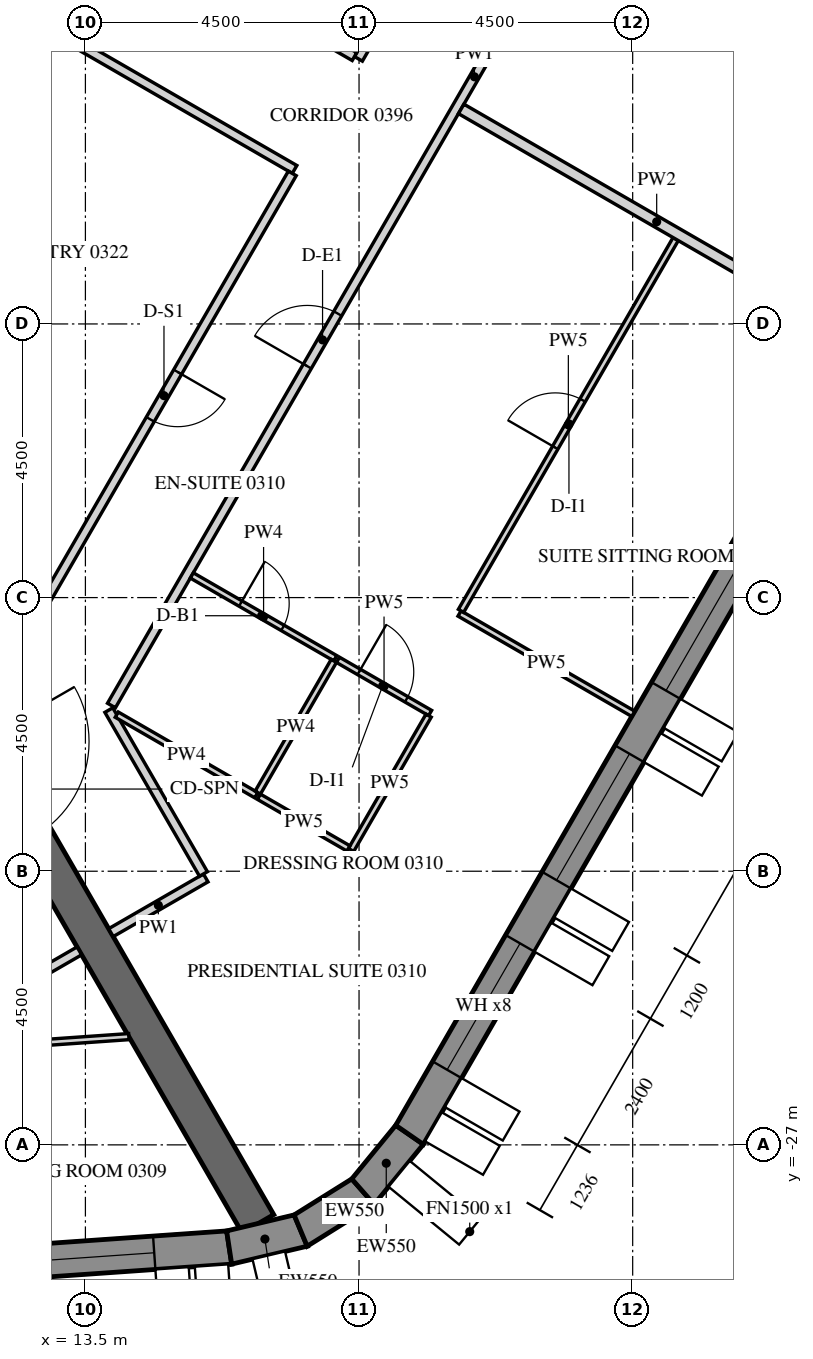
"""IFC4 building model, lengths in metres.
Left out: names, types, materials, properties, quantities, classifications, styles, units other than length and angle.
Written with IfcOpenShell. Run it as: python <this file> out.ifc"""

import sys

from ifc_helpers import new_model, si_unit, direction, frame, frame_2d, origin, place, context, subcontext, project, spatial, polyline, rectangle, outline, extrude, element, fill, save


model = new_model("IFC4")
c1 = context("Model", 3, precision=1e-05, world=origin(), true_north=direction((0.0, 1.0)))
c2 = subcontext(c1, "Body", "Model", "MODEL_VIEW")
j1 = project(units=[si_unit("LENGTHUNIT", "METRE"), si_unit("PLANEANGLEUNIT", "RADIAN")], contexts=[c1])
p1 = place(None, origin())
s1 = spatial("IfcSite", under=j1, at=p1, CompositionType="ELEMENT")
p2 = place(p1, origin())
s2 = spatial("IfcBuilding", under=s1, at=p2, CompositionType="ELEMENT")
p3 = place(p2, frame((0.0, 0.0, 60.9)))
s3 = spatial("IfcBuildingStorey", under=s2, at=p3, CompositionType="ELEMENT", Elevation=60.9)
p4 = place(p3, frame((-14.134, -30.786, -0.15), z_axis=(0.0, 0.0, 1.0), x_axis=(0.997564037441, 0.069756657061, 0.0)))
e1 = element("IfcWall", 1, at=p4, inside=s3, PredefinedType="SOLIDWALL", context=c2, shape_type="SweptSolid", body=[
    extrude(outline(polyline([(-0.026, -0.275), (30.094, -0.275), (30.049, 0.275), (0.026, 0.275), (-0.026, -0.275)])), origin(), (0.0, 0.0, 1.0), 3.9),
])
p5 = place(p4, frame((1.236, 0.0, 1.05)))
e2 = element("IfcOpeningElement", 2, at=p5, cuts=e1, PredefinedType="OPENING", context=c2, shape_type="SweptSolid", body=[
    extrude(rectangle(XDim=2.4, YDim=2.4, at=frame_2d((1.2, 1.2))), frame((0.0, 0.285, 0.0), z_axis=(0.0, -1.0, 0.0), x_axis=(1.0, 0.0, 0.0)), (0.0, 0.0, 1.0), 0.57),
])
p6 = place(p4, frame((4.835, 0.0, 1.05)))
e3 = element("IfcOpeningElement", 3, at=p6, cuts=e1, PredefinedType="OPENING", context=c2, shape_type="SweptSolid", body=[
    extrude(rectangle(XDim=2.4, YDim=2.4, at=frame_2d((1.2, 1.2))), frame((0.0, 0.285, 0.0), z_axis=(0.0, -1.0, 0.0), x_axis=(1.0, 0.0, 0.0)), (0.0, 0.0, 1.0), 0.57),
])
p7 = place(p4, frame((8.436, 0.0, 1.05)))
e4 = element("IfcOpeningElement", 4, at=p7, cuts=e1, PredefinedType="OPENING", context=c2, shape_type="SweptSolid", body=[
    extrude(rectangle(XDim=2.4, YDim=2.4, at=frame_2d((1.2, 1.2))), frame((0.0, 0.285, 0.0), z_axis=(0.0, -1.0, 0.0), x_axis=(1.0, 0.0, 0.0)), (0.0, 0.0, 1.0), 0.57),
])
p8 = place(p4, frame((12.035, 0.0, 1.05)))
e5 = element("IfcOpeningElement", 5, at=p8, cuts=e1, PredefinedType="OPENING", context=c2, shape_type="SweptSolid", body=[
    extrude(rectangle(XDim=2.4, YDim=2.4, at=frame_2d((1.2, 1.2))), frame((0.0, 0.285, 0.0), z_axis=(0.0, -1.0, 0.0), x_axis=(1.0, 0.0, 0.0)), (0.0, 0.0, 1.0), 0.57),
])
p9 = place(p4, frame((15.635, 0.0, 1.05)))
e6 = element("IfcOpeningElement", 6, at=p9, cuts=e1, PredefinedType="OPENING", context=c2, shape_type="SweptSolid", body=[
    extrude(rectangle(XDim=2.4, YDim=2.4, at=frame_2d((1.2, 1.2))), frame((0.0, 0.285, 0.0), z_axis=(0.0, -1.0, 0.0), x_axis=(1.0, 0.0, 0.0)), (0.0, 0.0, 1.0), 0.57),
])
p10 = place(p4, frame((19.236, 0.0, 1.05)))
e7 = element("IfcOpeningElement", 7, at=p10, cuts=e1, PredefinedType="OPENING", context=c2, shape_type="SweptSolid", body=[
    extrude(rectangle(XDim=2.4, YDim=2.4, at=frame_2d((1.2, 1.2))), frame((0.0, 0.285, 0.0), z_axis=(0.0, -1.0, 0.0), x_axis=(1.0, 0.0, 0.0)), (0.0, 0.0, 1.0), 0.57),
])
p11 = place(p4, frame((22.835, 0.0, 1.05)))
e8 = element("IfcOpeningElement", 8, at=p11, cuts=e1, PredefinedType="OPENING", context=c2, shape_type="SweptSolid", body=[
    extrude(rectangle(XDim=2.4, YDim=2.4, at=frame_2d((1.2, 1.2))), frame((0.0, 0.285, 0.0), z_axis=(0.0, -1.0, 0.0), x_axis=(1.0, 0.0, 0.0)), (0.0, 0.0, 1.0), 0.57),
])
p12 = place(p4, frame((26.436, 0.0, 1.05)))
e9 = element("IfcOpeningElement", 9, at=p12, cuts=e1, PredefinedType="OPENING", context=c2, shape_type="SweptSolid", body=[
    extrude(rectangle(XDim=2.4, YDim=2.4, at=frame_2d((1.2, 1.2))), frame((0.0, 0.285, 0.0), z_axis=(0.0, -1.0, 0.0), x_axis=(1.0, 0.0, 0.0)), (0.0, 0.0, 1.0), 0.57),
])
p13 = place(p3, frame((15.864, -28.688, -0.15), z_axis=(0.0, 0.0, 1.0), x_axis=(0.973063591128, 0.230536868247, 0.0)))
e10 = element("IfcWall", 10, at=p13, inside=s3, PredefinedType="SOLIDWALL", context=c2, shape_type="SweptSolid", body=[
    extrude(outline(polyline([(-0.022, -0.275), (1.253, -0.275), (1.163, 0.275), (0.022, 0.275), (-0.022, -0.275)])), origin(), (0.0, 0.0, 1.0), 3.9),
])
p14 = place(p3, frame((17.04, -28.41, -0.15), z_axis=(0.0, 0.0, 1.0), x_axis=(0.847952888306, 0.530071598195, 0.0)))
e11 = element("IfcWall", 11, at=p14, inside=s3, PredefinedType="SOLIDWALL", context=c2, shape_type="SweptSolid", body=[
    extrude(outline(polyline([(-0.045, -0.275), (1.253, -0.275), (1.163, 0.275), (0.045, 0.275), (-0.045, -0.275)])), origin(), (0.0, 0.0, 1.0), 3.9),
])
p15 = place(p3, frame((18.064, -27.769, -0.15), z_axis=(0.0, 0.0, 1.0), x_axis=(0.633842757806, 0.773461930787, 0.0)))
e12 = element("IfcWall", 12, at=p15, inside=s3, PredefinedType="SOLIDWALL", context=c2, shape_type="SweptSolid", body=[
    extrude(outline(polyline([(-0.045, -0.275), (1.231, -0.275), (1.186, 0.275), (0.045, 0.275), (-0.045, -0.275)])), origin(), (0.0, 0.0, 1.0), 3.9),
])
p16 = place(p3, frame((18.83, -26.835, -0.15), z_axis=(0.0, 0.0, 1.0), x_axis=(0.500003800416, 0.866023209602, 0.0)))
e13 = element("IfcWall", 13, at=p16, inside=s3, PredefinedType="SOLIDWALL", context=c2, shape_type="SweptSolid", body=[
    extrude(outline(polyline([(-0.022, -0.275), (30.097, -0.275), (30.045, 0.275), (0.022, 0.275), (-0.022, -0.275)])), origin(), (0.0, 0.0, 1.0), 3.9),
])
p17 = place(p16, frame((1.236, 0.0, 1.05)))
e14 = element("IfcOpeningElement", 14, at=p17, cuts=e13, PredefinedType="OPENING", context=c2, shape_type="SweptSolid", body=[
    extrude(rectangle(XDim=2.4, YDim=2.4, at=frame_2d((1.2, 1.2))), frame((0.0, 0.285, 0.0), z_axis=(0.0, -1.0, 0.0), x_axis=(1.0, 0.0, 0.0)), (0.0, 0.0, 1.0), 0.57),
])
p18 = place(p16, frame((4.835, 0.0, 1.05)))
e15 = element("IfcOpeningElement", 15, at=p18, cuts=e13, PredefinedType="OPENING", context=c2, shape_type="SweptSolid", body=[
    extrude(rectangle(XDim=2.4, YDim=2.4, at=frame_2d((1.2, 1.2))), frame((0.0, 0.285, 0.0), z_axis=(0.0, -1.0, 0.0), x_axis=(1.0, 0.0, 0.0)), (0.0, 0.0, 1.0), 0.57),
])
p19 = place(p16, frame((8.436, 0.0, 1.05)))
e16 = element("IfcOpeningElement", 16, at=p19, cuts=e13, PredefinedType="OPENING", context=c2, shape_type="SweptSolid", body=[
    extrude(rectangle(XDim=2.4, YDim=2.4, at=frame_2d((1.2, 1.2))), frame((0.0, 0.285, 0.0), z_axis=(0.0, -1.0, 0.0), x_axis=(1.0, 0.0, 0.0)), (0.0, 0.0, 1.0), 0.57),
])
p20 = place(p16, frame((12.035, 0.0, 1.05)))
e17 = element("IfcOpeningElement", 17, at=p20, cuts=e13, PredefinedType="OPENING", context=c2, shape_type="SweptSolid", body=[
    extrude(rectangle(XDim=2.4, YDim=2.4, at=frame_2d((1.2, 1.2))), frame((0.0, 0.285, 0.0), z_axis=(0.0, -1.0, 0.0), x_axis=(1.0, 0.0, 0.0)), (0.0, 0.0, 1.0), 0.57),
])
p21 = place(p16, frame((15.635, 0.0, 1.05)))
e18 = element("IfcOpeningElement", 18, at=p21, cuts=e13, PredefinedType="OPENING", context=c2, shape_type="SweptSolid", body=[
    extrude(rectangle(XDim=2.4, YDim=2.4, at=frame_2d((1.2, 1.2))), frame((0.0, 0.285, 0.0), z_axis=(0.0, -1.0, 0.0), x_axis=(1.0, 0.0, 0.0)), (0.0, 0.0, 1.0), 0.57),
])
p22 = place(p16, frame((19.236, 0.0, 1.05)))
e19 = element("IfcOpeningElement", 19, at=p22, cuts=e13, PredefinedType="OPENING", context=c2, shape_type="SweptSolid", body=[
    extrude(rectangle(XDim=2.4, YDim=2.4, at=frame_2d((1.2, 1.2))), frame((0.0, 0.285, 0.0), z_axis=(0.0, -1.0, 0.0), x_axis=(1.0, 0.0, 0.0)), (0.0, 0.0, 1.0), 0.57),
])
p23 = place(p16, frame((22.835, 0.0, 1.05)))
e20 = element("IfcOpeningElement", 20, at=p23, cuts=e13, PredefinedType="OPENING", context=c2, shape_type="SweptSolid", body=[
    extrude(rectangle(XDim=2.4, YDim=2.4, at=frame_2d((1.2, 1.2))), frame((0.0, 0.285, 0.0), z_axis=(0.0, -1.0, 0.0), x_axis=(1.0, 0.0, 0.0)), (0.0, 0.0, 1.0), 0.57),
])
p24 = place(p16, frame((26.436, 0.0, 1.05)))
e21 = element("IfcOpeningElement", 21, at=p24, cuts=e13, PredefinedType="OPENING", context=c2, shape_type="SweptSolid", body=[
    extrude(rectangle(XDim=2.4, YDim=2.4, at=frame_2d((1.2, 1.2))), frame((0.0, 0.285, 0.0), z_axis=(0.0, -1.0, 0.0), x_axis=(1.0, 0.0, 0.0)), (0.0, 0.0, 1.0), 0.57),
])
p25 = place(p3, frame((7.91, -13.7, -0.15), z_axis=(0.0, 0.0, 1.0), x_axis=(0.499999880136, 0.866025472988, 0.0)))
e22 = element("IfcWall", 22, at=p25, inside=s3, PredefinedType="SHEAR", context=c2, shape_type="SweptSolid", body=[
    extrude(outline(polyline([(-0.173, -0.3), (15.993, -0.3), (15.646, 0.3), (0.173, 0.3), (-0.173, -0.3)])), origin(), (0.0, 0.0, 1.0), 3.9),
])
p26 = place(p25, frame((7.039, 0.0, 0.15)))
e23 = element("IfcOpeningElement", 23, at=p26, cuts=e22, PredefinedType="OPENING", context=c2, shape_type="SweptSolid", body=[
    extrude(rectangle(XDim=1.8, YDim=2.4, at=frame_2d((0.9, 1.2))), frame((0.0, 0.31, 0.0), z_axis=(0.0, -1.0, 0.0), x_axis=(1.0, 0.0, 0.0)), (0.0, 0.0, 1.0), 0.62),
])
p27 = place(p3, frame((8.083, -14.0, -0.15), z_axis=(0.0, 0.0, 1.0), x_axis=(0.499997680643, -0.866026742862, 0.0)))
e24 = element("IfcWall", 24, at=p27, inside=s3, PredefinedType="SHEAR", context=c2, shape_type="SweptSolid", body=[
    extrude(rectangle(XDim=16.509, YDim=0.6, at=frame_2d((8.254, 0.0))), origin(), (0.0, 0.0, 1.0), 3.9),
])
p28 = place(p27, frame((7.354, 0.0, 0.15)))
e25 = element("IfcOpeningElement", 25, at=p28, cuts=e24, PredefinedType="OPENING", context=c2, shape_type="SweptSolid", body=[
    extrude(rectangle(XDim=1.8, YDim=2.4, at=frame_2d((0.9, 1.2))), frame((0.0, 0.31, 0.0), z_axis=(0.0, -1.0, 0.0), x_axis=(1.0, 0.0, 0.0)), (0.0, 0.0, 1.0), 0.62),
])
p29 = place(p3, frame((11.906, -24.673, 0.0), z_axis=(0.0, 0.0, 1.0), x_axis=(0.866013532718, 0.500020560727, 0.0)))
e26 = element("IfcWall", 26, at=p29, inside=s3, PredefinedType="PARTITIONING", context=c2, shape_type="SweptSolid", body=[
    extrude(rectangle(XDim=1.725, YDim=0.15, at=frame_2d((0.863, 0.0))), origin(), (0.0, 0.0, 1.0), 2.988),
])
p30 = place(p3, frame((13.92, -23.51, 0.0), z_axis=(0.0, 0.0, 1.0), x_axis=(0.866047807691, 0.499961193289, 0.0)))
e27 = element("IfcWall", 27, at=p30, inside=s3, PredefinedType="PARTITIONING", context=c2, shape_type="SweptSolid", body=[
    extrude(rectangle(XDim=1.8, YDim=0.15, at=frame_2d((0.9, 0.0))), origin(), (0.0, 0.0, 1.0), 2.988),
])
p31 = place(p3, frame((15.441, -22.545, 0.0), z_axis=(0.0, 0.0, 1.0), x_axis=(-0.500037089193, 0.86600398927, 0.0)))
e28 = element("IfcWall", 28, at=p31, inside=s3, PredefinedType="PARTITIONING", context=c2, shape_type="SweptSolid", body=[
    extrude(rectangle(XDim=3.112, YDim=0.15, at=frame_2d((1.556, 0.0))), origin(), (0.0, 0.0, 1.0), 2.988),
])
p32 = place(p3, frame((13.928, -19.775, 0.0), z_axis=(0.0, 0.0, 1.0), x_axis=(0.50000450071, 0.866022805283, 0.0)))
e29 = element("IfcWall", 29, at=p32, inside=s3, PredefinedType="PARTITIONING", context=c2, shape_type="SweptSolid", body=[
    extrude(rectangle(XDim=23.877, YDim=0.15, at=frame_2d((11.938, 0.0))), origin(), (0.0, 0.0, 1.0), 2.988),
])
p33 = place(p32, frame((6.443, 0.0, 0.0)))
e30 = element("IfcOpeningElement", 30, at=p33, cuts=e29, PredefinedType="OPENING", context=c2, shape_type="SweptSolid", body=[
    extrude(rectangle(XDim=1.0, YDim=2.1, at=frame_2d((0.5, 1.05))), frame((0.0, 0.085, 0.0), z_axis=(0.0, -1.0, 0.0), x_axis=(1.0, 0.0, 0.0)), (0.0, 0.0, 1.0), 0.17),
])
p34 = place(p32, frame((14.972, 0.0, 0.0)))
e31 = element("IfcOpeningElement", 31, at=p34, cuts=e29, PredefinedType="OPENING", context=c2, shape_type="SweptSolid", body=[
    extrude(rectangle(XDim=1.0, YDim=2.1, at=frame_2d((0.5, 1.05))), frame((0.0, 0.085, 0.0), z_axis=(0.0, -1.0, 0.0), x_axis=(1.0, 0.0, 0.0)), (0.0, 0.0, 1.0), 0.17),
])
p35 = place(p3, frame((23.704, 0.757, 0.0), z_axis=(0.0, 0.0, 1.0), x_axis=(-0.500010297365, -0.866019458516, 0.0)))
e32 = element("IfcWall", 32, at=p35, inside=s3, PredefinedType="PARTITIONING", context=c2, shape_type="SweptSolid", body=[
    extrude(rectangle(XDim=11.429, YDim=0.15, at=frame_2d((5.714, 0.0))), origin(), (0.0, 0.0, 1.0), 2.988),
])
p36 = place(p35, frame((5.264, 0.0, 0.0)))
e33 = element("IfcOpeningElement", 33, at=p36, cuts=e32, PredefinedType="OPENING", context=c2, shape_type="SweptSolid", body=[
    extrude(rectangle(XDim=0.9, YDim=2.1, at=frame_2d((0.45, 1.05))), frame((0.0, 0.085, 0.0), z_axis=(0.0, -1.0, 0.0), x_axis=(1.0, 0.0, 0.0)), (0.0, 0.0, 1.0), 0.17),
])
p37 = place(p3, frame((17.925, -9.103, 0.0), z_axis=(0.0, 0.0, 1.0), x_axis=(-0.866013586754, 0.500020467139, 0.0)))
e34 = element("IfcWall", 34, at=p37, inside=s3, PredefinedType="PARTITIONING", context=c2, shape_type="SweptSolid", body=[
    extrude(rectangle(XDim=6.075, YDim=0.15, at=frame_2d((3.038, 0.0))), origin(), (0.0, 0.0, 1.0), 2.988),
])
p38 = place(p3, frame((11.614, -7.884, 0.0), z_axis=(0.0, 0.0, 1.0), x_axis=(0.866033542371, -0.499985903289, 0.0)))
e35 = element("IfcWall", 35, at=p38, inside=s3, PredefinedType="PARTITIONING", context=c2, shape_type="SweptSolid", body=[
    extrude(rectangle(XDim=6.15, YDim=0.15, at=frame_2d((3.075, 0.0))), origin(), (0.0, 0.0, 1.0), 2.988),
])
p39 = place(p3, frame((16.902, -11.024, 0.0), z_axis=(0.0, 0.0, 1.0), x_axis=(-0.499999527968, -0.866025676312, 0.0)))
e36 = element("IfcWall", 36, at=p39, inside=s3, PredefinedType="PARTITIONING", context=c2, shape_type="SweptSolid", body=[
    extrude(rectangle(XDim=8.441, YDim=0.15, at=frame_2d((4.22, 0.0))), origin(), (0.0, 0.0, 1.0), 2.988),
])
p40 = place(p39, frame((3.771, 0.0, 0.0)))
e37 = element("IfcOpeningElement", 37, at=p40, cuts=e36, PredefinedType="OPENING", context=c2, shape_type="SweptSolid", body=[
    extrude(rectangle(XDim=0.9, YDim=2.1, at=frame_2d((0.45, 1.05))), frame((0.0, 0.085, 0.0), z_axis=(0.0, -1.0, 0.0), x_axis=(1.0, 0.0, 0.0)), (0.0, 0.0, 1.0), 0.17),
])
p41 = place(p3, frame((7.848, -25.665, 0.0), z_axis=(0.0, 0.0, 1.0), x_axis=(0.997564959643, 0.069743467744, 0.0)))
e38 = element("IfcWall", 38, at=p41, inside=s3, PredefinedType="PARTITIONING", context=c2, shape_type="SweptSolid", body=[
    extrude(rectangle(XDim=6.382, YDim=0.1, at=frame_2d((3.191, 0.0))), origin(), (0.0, 0.0, 1.0), 2.988),
])
p42 = place(p41, frame((3.1, 0.0, 0.0)))
e39 = element("IfcOpeningElement", 39, at=p42, cuts=e38, PredefinedType="OPENING", context=c2, shape_type="SweptSolid", body=[
    extrude(rectangle(XDim=0.9, YDim=2.1, at=frame_2d((0.45, 1.05))), frame((0.0, 0.06, 0.0), z_axis=(0.0, -1.0, 0.0), x_axis=(1.0, 0.0, 0.0)), (0.0, 0.0, 1.0), 0.12),
])
p43 = place(p3, frame((16.31, -21.25, 0.0), z_axis=(0.0, 0.0, 1.0), x_axis=(-0.866029095148, 0.499993606316, 0.0)))
e40 = element("IfcWall", 40, at=p43, inside=s3, PredefinedType="PARTITIONING", context=c2, shape_type="SweptSolid", body=[
    extrude(rectangle(XDim=2.65, YDim=0.1, at=frame_2d((1.325, 0.0))), origin(), (0.0, 0.0, 1.0), 2.988),
])
p44 = place(p3, frame((15.25, -17.636, 0.0), z_axis=(0.0, 0.0, 1.0), x_axis=(0.866012511928, -0.500022328685, 0.0)))
e41 = element("IfcWall", 41, at=p44, inside=s3, PredefinedType="PARTITIONING", context=c2, shape_type="SweptSolid", body=[
    extrude(rectangle(XDim=2.725, YDim=0.1, at=frame_2d((1.363, 0.0))), origin(), (0.0, 0.0, 1.0), 2.988),
])
p45 = place(p44, frame((0.925, 0.0, 0.0)))
e42 = element("IfcOpeningElement", 42, at=p45, cuts=e41, PredefinedType="OPENING", context=c2, shape_type="SweptSolid", body=[
    extrude(rectangle(XDim=0.8, YDim=2.1, at=frame_2d((0.4, 1.05))), frame((0.0, 0.06, 0.0), z_axis=(0.0, -1.0, 0.0), x_axis=(1.0, 0.0, 0.0)), (0.0, 0.0, 1.0), 0.12),
])
p46 = place(p3, frame((17.654, -19.023, 0.0), z_axis=(0.0, 0.0, 1.0), x_axis=(0.866002029911, -0.500040482552, 0.0)))
e43 = element("IfcWall", 43, at=p46, inside=s3, PredefinedType="PARTITIONING", context=c2, shape_type="SweptSolid", body=[
    extrude(rectangle(XDim=1.75, YDim=0.1, at=frame_2d((0.875, 0.0))), origin(), (0.0, 0.0, 1.0), 2.988),
])
p47 = place(p46, frame((0.4, 0.0, 0.0)))
e44 = element("IfcOpeningElement", 44, at=p47, cuts=e43, PredefinedType="OPENING", context=c2, shape_type="SweptSolid", body=[
    extrude(rectangle(XDim=0.9, YDim=2.1, at=frame_2d((0.45, 1.05))), frame((0.0, 0.06, 0.0), z_axis=(0.0, -1.0, 0.0), x_axis=(1.0, 0.0, 0.0)), (0.0, 0.0, 1.0), 0.12),
])
p48 = place(p3, frame((19.144, -19.942, 0.0), z_axis=(0.0, 0.0, 1.0), x_axis=(-0.500062241894, -0.865989465428, 0.0)))
e45 = element("IfcWall", 45, at=p48, inside=s3, PredefinedType="PARTITIONING", context=c2, shape_type="SweptSolid", body=[
    extrude(rectangle(XDim=2.55, YDim=0.1, at=frame_2d((1.275, 0.0))), origin(), (0.0, 0.0, 1.0), 2.988),
])
p49 = place(p3, frame((17.826, -22.125, 0.0), z_axis=(0.0, 0.0, 1.0), x_axis=(-0.865989465428, 0.500062241894, 0.0)))
e46 = element("IfcWall", 46, at=p49, inside=s3, PredefinedType="PARTITIONING", context=c2, shape_type="SweptSolid", body=[
    extrude(rectangle(XDim=1.7, YDim=0.1, at=frame_2d((0.85, 0.0))), origin(), (0.0, 0.0, 1.0), 2.988),
])
p50 = place(p3, frame((22.51, -19.912, 0.0), z_axis=(0.0, 0.0, 1.0), x_axis=(-0.866008176907, 0.50002983664, 0.0)))
e47 = element("IfcWall", 47, at=p50, inside=s3, PredefinedType="PARTITIONING", context=c2, shape_type="SweptSolid", body=[
    extrude(rectangle(XDim=3.3, YDim=0.1, at=frame_2d((1.65, 0.0))), origin(), (0.0, 0.0, 1.0), 2.988),
])
p51 = place(p3, frame((19.677, -18.218, 0.0), z_axis=(0.0, 0.0, 1.0), x_axis=(0.500010820671, 0.866019156377, 0.0)))
e48 = element("IfcWall", 48, at=p51, inside=s3, PredefinedType="PARTITIONING", context=c2, shape_type="SweptSolid", body=[
    extrude(rectangle(XDim=7.06, YDim=0.1, at=frame_2d((3.53, 0.0))), origin(), (0.0, 0.0, 1.0), 2.988),
])
p52 = place(p51, frame((3.1, 0.0, 0.0)))
e49 = element("IfcOpeningElement", 49, at=p52, cuts=e48, PredefinedType="OPENING", context=c2, shape_type="SweptSolid", body=[
    extrude(rectangle(XDim=0.9, YDim=2.1, at=frame_2d((0.45, 1.05))), frame((0.0, 0.06, 0.0), z_axis=(0.0, -1.0, 0.0), x_axis=(1.0, 0.0, 0.0)), (0.0, 0.0, 1.0), 0.12),
])
p53 = place(p3, frame((26.11, -13.676, 0.0), z_axis=(0.0, 0.0, 1.0), x_axis=(-0.866014745021, 0.500018461065, 0.0)))
e50 = element("IfcWall", 50, at=p53, inside=s3, PredefinedType="PARTITIONING", context=c2, shape_type="SweptSolid", body=[
    extrude(rectangle(XDim=7.425, YDim=0.18, at=frame_2d((3.712, 0.0))), origin(), (0.0, 0.0, 1.0), 2.988),
])
p54 = place(p3, frame((16.335, -21.207, 0.0), z_axis=(0.0, 0.0, 1.0), x_axis=(0.500004234368, 0.866022959057, 0.0)))
e51 = element("IfcWall", 51, at=p54, inside=s3, PredefinedType="PARTITIONING", context=c2, shape_type="SweptSolid", body=[
    extrude(rectangle(XDim=2.5, YDim=0.1, at=frame_2d((1.25, 0.0))), origin(), (0.0, 0.0, 1.0), 2.988),
])
p55 = place(p12, frame((0.0, 0.205, 0.0)))
e52 = element("IfcWindow", 52, at=p55, inside=s3, PartitioningType="DOUBLE_PANEL_VERTICAL", PredefinedType="WINDOW", context=c2, shape_type="SweptSolid", body=[
    extrude(rectangle(XDim=2.4, YDim=2.4, at=frame_2d((1.2, 1.2))), frame((0.0, 0.03, 0.0), z_axis=(0.0, -1.0, 0.0), x_axis=(1.0, 0.0, 0.0)), (0.0, 0.0, 1.0), 0.06),
])
fill(e9, e52)
p56 = place(p17, frame((0.0, 0.205, 0.0)))
e53 = element("IfcWindow", 53, at=p56, inside=s3, PartitioningType="DOUBLE_PANEL_VERTICAL", PredefinedType="WINDOW", context=c2, shape_type="SweptSolid", body=[
    extrude(rectangle(XDim=2.4, YDim=2.4, at=frame_2d((1.2, 1.2))), frame((0.0, 0.03, 0.0), z_axis=(0.0, -1.0, 0.0), x_axis=(1.0, 0.0, 0.0)), (0.0, 0.0, 1.0), 0.06),
])
fill(e14, e53)
p57 = place(p18, frame((0.0, 0.205, 0.0)))
e54 = element("IfcWindow", 54, at=p57, inside=s3, PartitioningType="DOUBLE_PANEL_VERTICAL", PredefinedType="WINDOW", context=c2, shape_type="SweptSolid", body=[
    extrude(rectangle(XDim=2.4, YDim=2.4, at=frame_2d((1.2, 1.2))), frame((0.0, 0.03, 0.0), z_axis=(0.0, -1.0, 0.0), x_axis=(1.0, 0.0, 0.0)), (0.0, 0.0, 1.0), 0.06),
])
fill(e15, e54)
p58 = place(p19, frame((0.0, 0.205, 0.0)))
e55 = element("IfcWindow", 55, at=p58, inside=s3, PartitioningType="DOUBLE_PANEL_VERTICAL", PredefinedType="WINDOW", context=c2, shape_type="SweptSolid", body=[
    extrude(rectangle(XDim=2.4, YDim=2.4, at=frame_2d((1.2, 1.2))), frame((0.0, 0.03, 0.0), z_axis=(0.0, -1.0, 0.0), x_axis=(1.0, 0.0, 0.0)), (0.0, 0.0, 1.0), 0.06),
])
fill(e16, e55)
p59 = place(p33, origin())
e56 = element("IfcDoor", 56, at=p59, inside=s3, OperationType="SINGLE_SWING_RIGHT", PredefinedType="DOOR", context=c2, shape_type="SweptSolid", body=[
    extrude(rectangle(XDim=1.0, YDim=2.1, at=frame_2d((0.5, 1.05))), frame((0.0, 0.025, 0.0), z_axis=(0.0, -1.0, 0.0), x_axis=(1.0, 0.0, 0.0)), (0.0, 0.0, 1.0), 0.05),
])
fill(e30, e56)
p60 = place(p45, origin())
e57 = element("IfcDoor", 57, at=p60, inside=s3, OperationType="SINGLE_SWING_RIGHT", PredefinedType="DOOR", context=c2, shape_type="SweptSolid", body=[
    extrude(rectangle(XDim=0.8, YDim=2.1, at=frame_2d((0.4, 1.05))), frame((0.0, 0.025, 0.0), z_axis=(0.0, -1.0, 0.0), x_axis=(1.0, 0.0, 0.0)), (0.0, 0.0, 1.0), 0.05),
])
fill(e42, e57)
p61 = place(p47, origin())
e58 = element("IfcDoor", 58, at=p61, inside=s3, OperationType="SINGLE_SWING_RIGHT", PredefinedType="DOOR", context=c2, shape_type="SweptSolid", body=[
    extrude(rectangle(XDim=0.9, YDim=2.1, at=frame_2d((0.45, 1.05))), frame((0.0, 0.025, 0.0), z_axis=(0.0, -1.0, 0.0), x_axis=(1.0, 0.0, 0.0)), (0.0, 0.0, 1.0), 0.05),
])
fill(e44, e58)
p62 = place(p52, origin())
e59 = element("IfcDoor", 59, at=p62, inside=s3, OperationType="SINGLE_SWING_LEFT", PredefinedType="DOOR", context=c2, shape_type="SweptSolid", body=[
    extrude(rectangle(XDim=0.9, YDim=2.1, at=frame_2d((0.45, 1.05))), frame((0.0, 0.025, 0.0), z_axis=(0.0, -1.0, 0.0), x_axis=(1.0, 0.0, 0.0)), (0.0, 0.0, 1.0), 0.05),
])
fill(e49, e59)
p63 = place(p40, origin())
e60 = element("IfcDoor", 60, at=p63, inside=s3, OperationType="SINGLE_SWING_RIGHT", PredefinedType="DOOR", context=c2, shape_type="SweptSolid", body=[
    extrude(rectangle(XDim=0.9, YDim=2.1, at=frame_2d((0.45, 1.05))), frame((0.0, 0.025, 0.0), z_axis=(0.0, -1.0, 0.0), x_axis=(1.0, 0.0, 0.0)), (0.0, 0.0, 1.0), 0.05),
])
fill(e37, e60)
save(model, sys.argv[1])
